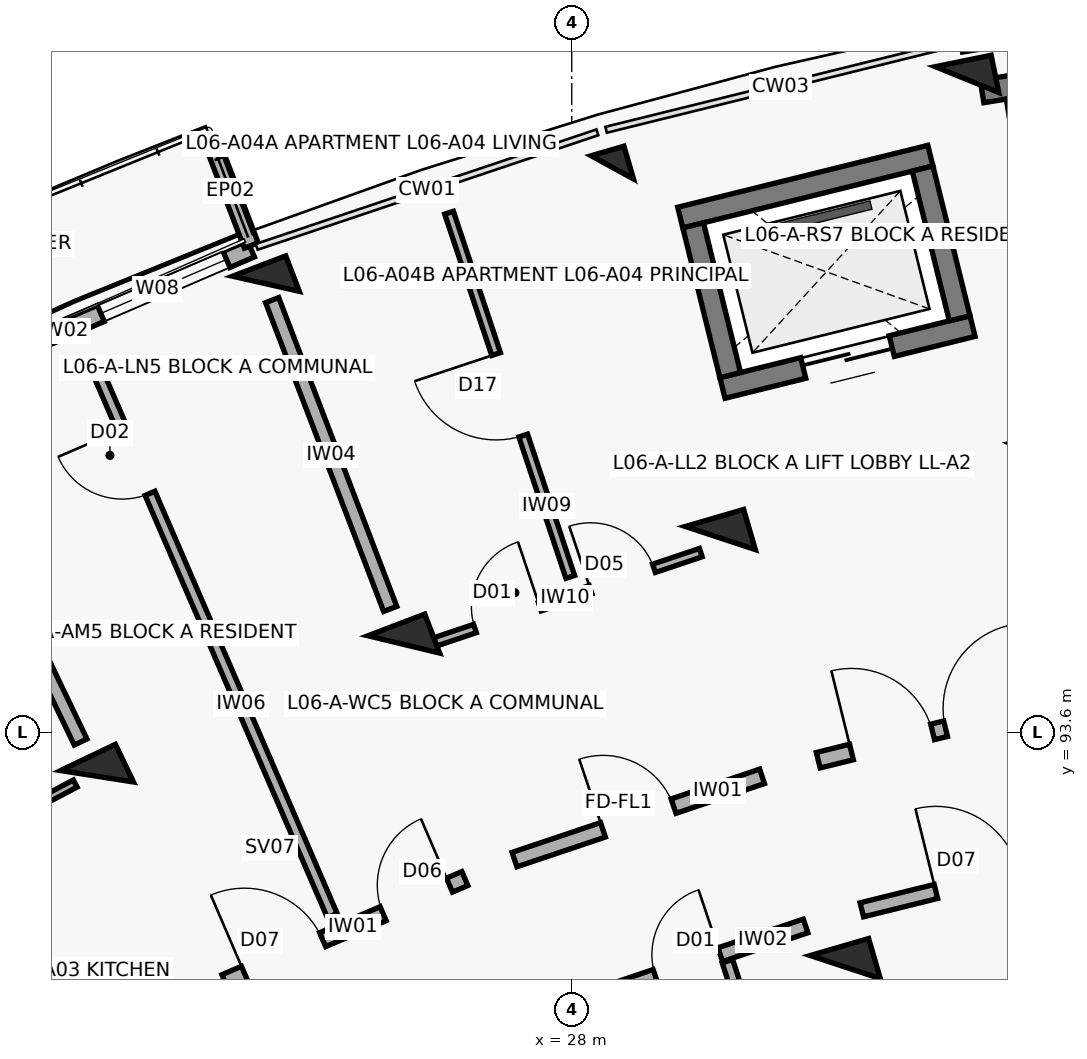
"""IFC4 building model, lengths in metres.
Left out: names, types, materials, properties, quantities, classifications, styles, units other than length and angle.
Written with IfcOpenShell. Run it as: python <this file> out.ifc"""

import sys

from ifc_helpers import new_model, si_unit, direction, frame, frame_2d, origin, origin_2d, place, context, subcontext, project, spatial, rectangle, extrude, element, fill, save


model = new_model("IFC4")
c1 = context("Model", 3, precision=1e-05, world=origin(), true_north=direction((0.0, 1.0)))
c2 = subcontext(c1, "Body", "Model", "MODEL_VIEW")
j1 = project(units=[si_unit("LENGTHUNIT", "METRE"), si_unit("PLANEANGLEUNIT", "RADIAN")], contexts=[c1])
p1 = place(None, origin())
s1 = spatial("IfcSite", under=j1, at=p1, CompositionType="ELEMENT")
p2 = place(p1, origin())
s2 = spatial("IfcBuilding", under=s1, at=p2, CompositionType="ELEMENT")
p3 = place(p2, frame((0.0, 0.0, 20.5)))
s3 = spatial("IfcBuildingStorey", under=s2, at=p3, CompositionType="ELEMENT", Elevation=20.5)
for number, where, z_axis, x_axis in (
    (1, (21.754, 93.019, 0.0), (0.0, 0.0, 1.0), (-0.432, 0.902, 0.0)),
    (2, (25.79, 94.753, 0.0), (0.0, 0.0, 1.0), (-0.357, 0.934, 0.0)),
):
    element("IfcColumn", number, at=place(p3, frame(where, z_axis=z_axis, x_axis=x_axis)), inside=s3, PredefinedType="COLUMN", context=c2, shape_type="SweptSolid", body=[
        extrude(rectangle(XDim=0.55, YDim=0.8, at=origin_2d()), origin(), (0.0, 0.0, 1.0), 3.1),
    ])
p4 = place(p3, frame((23.976, 99.499, 0.0), z_axis=(0.0, 0.0, 1.0), x_axis=(-0.357064076459, 0.934079892355, 0.0)))
e3 = element("IfcColumn", 3, at=p4, inside=s3, PredefinedType="COLUMN", context=c2, shape_type="SweptSolid", body=[
    extrude(rectangle(XDim=0.5, YDim=0.75, at=origin_2d()), origin(), (0.0, 0.0, 1.0), 3.1),
])
for number, where, z_axis, x_axis in (
    (4, (31.599, 90.508, 0.0), (0.0, 0.0, 1.0), (-0.28, 0.96, 0.0)),
    (5, (29.954, 96.153, 0.0), (0.0, 0.0, 1.0), (-0.28, 0.96, 0.0)),
):
    element("IfcColumn", number, at=place(p3, frame(where, z_axis=z_axis, x_axis=x_axis)), inside=s3, PredefinedType="COLUMN", context=c2, shape_type="SweptSolid", body=[
        extrude(rectangle(XDim=0.55, YDim=0.8, at=origin_2d()), origin(), (0.0, 0.0, 1.0), 3.1),
    ])
p5 = place(p3, frame((28.533, 101.031, 0.0), z_axis=(0.0, 0.0, 1.0), x_axis=(-0.27966144946, 0.96009867914, 0.0)))
e6 = element("IfcColumn", 6, at=p5, inside=s3, PredefinedType="COLUMN", context=c2, shape_type="SweptSolid", body=[
    extrude(rectangle(XDim=0.45, YDim=0.45, at=origin_2d()), origin(), (0.0, 0.0, 1.0), 3.1),
])
p6 = place(p3, frame((33.201, 102.186, 0.0), z_axis=(0.0, 0.0, 1.0), x_axis=(-0.200393999665, 0.979715389742, 0.0)))
e7 = element("IfcColumn", 7, at=p6, inside=s3, PredefinedType="COLUMN", context=c2, shape_type="SweptSolid", body=[
    extrude(rectangle(XDim=0.5, YDim=0.75, at=origin_2d()), origin(), (0.0, 0.0, 1.0), 3.1),
])
p7 = place(p3, frame((19.361, 98.059, 0.0), z_axis=(0.0, 0.0, 1.0), x_axis=(0.918711189033, 0.394930058548, 0.0)))
e8 = element("IfcWall", 8, at=p7, inside=s3, PredefinedType="SOLIDWALL", context=c2, shape_type="SweptSolid", body=[
    extrude(rectangle(XDim=4.809, YDim=0.23, at=frame_2d((2.404, 0.0))), origin(), (0.0, 0.0, 1.0), 2.25),
])
p8 = place(p7, frame((0.4, 0.0, 0.0)))
e9 = element("IfcOpeningElement", 9, at=p8, cuts=e8, PredefinedType="OPENING", context=c2, shape_type="SweptSolid", body=[
    extrude(rectangle(XDim=1.1, YDim=2.15, at=frame_2d((0.55, 1.075))), frame((0.0, 0.125, 0.0), z_axis=(0.0, -1.0, 0.0), x_axis=(1.0, 0.0, 0.0)), (0.0, 0.0, 1.0), 0.25),
])
p9 = place(p7, frame((2.659, 0.0, 0.35)))
e10 = element("IfcOpeningElement", 10, at=p9, cuts=e8, PredefinedType="OPENING", context=c2, shape_type="SweptSolid", body=[
    extrude(rectangle(XDim=1.8, YDim=1.65, at=frame_2d((0.9, 0.825))), frame((0.0, 0.125, 0.0), z_axis=(0.0, -1.0, 0.0), x_axis=(1.0, 0.0, 0.0)), (0.0, 0.0, 1.0), 0.25),
])
p10 = place(p3, frame((23.783, 100.003, 0.0), z_axis=(0.0, 0.0, 1.0), x_axis=(-0.356957296461, 0.934120703391, 0.0)))
e11 = element("IfcWall", 11, at=p10, inside=s3, PredefinedType="PARAPET", context=c2, shape_type="SweptSolid", body=[
    extrude(rectangle(XDim=1.53, YDim=0.195, at=frame_2d((0.765, 0.0))), origin(), (0.0, 0.0, 1.0), 2.25),
])
p11 = place(p3, frame((33.12, 102.679, 0.0), z_axis=(0.0, 0.0, 1.0), x_axis=(0.987080750493, 0.160223568819, 0.0)))
e12 = element("IfcWall", 12, at=p11, inside=s3, PredefinedType="SOLIDWALL", context=c2, shape_type="SweptSolid", body=[
    extrude(rectangle(XDim=4.809, YDim=0.265, at=frame_2d((2.404, 0.0))), origin(), (0.0, 0.0, 1.0), 2.25),
])
p12 = place(p3, frame((37.81, 102.745, 0.0), z_axis=(0.0, 0.0, 1.0), x_axis=(-0.987084710126, -0.160199173019, 0.0)))
e13 = element("IfcWall", 13, at=p12, inside=s3, PredefinedType="SHEAR", context=c2, shape_type="SweptSolid", body=[
    extrude(rectangle(XDim=4.47, YDim=0.3, at=frame_2d((2.235, 0.0))), origin(), (0.0, 0.0, 1.0), 3.1),
])
p13 = place(p3, frame((35.098, 94.363, 0.0), z_axis=(0.0, 0.0, 1.0), x_axis=(-0.160227496777, 0.987080112897, 0.0)))
e14 = element("IfcWall", 14, at=p13, inside=s3, PredefinedType="SHEAR", context=c2, shape_type="SweptSolid", body=[
    extrude(rectangle(XDim=7.69, YDim=0.3, at=frame_2d((3.845, 0.0))), origin(), (0.0, 0.0, 1.0), 3.1),
])
p14 = place(p3, frame((33.273, 98.942, 0.0), z_axis=(0.0, 0.0, 1.0), x_axis=(-0.970707542441, -0.240264160972, 0.0)))
e15 = element("IfcWall", 15, at=p14, inside=s3, PredefinedType="SHEAR", context=c2, shape_type="SweptSolid", body=[
    extrude(rectangle(XDim=3.39, YDim=0.28, at=frame_2d((1.695, 0.0))), origin(), (0.0, 0.0, 1.0), 3.1),
])
p15 = place(p14, frame((1.095, 0.0, 0.0)))
e16 = element("IfcOpeningElement", 16, at=p15, cuts=e15, PredefinedType="OPENING", context=c2, shape_type="SweptSolid", body=[
    extrude(rectangle(XDim=1.2, YDim=2.15, at=frame_2d((0.6, 1.075))), frame((0.0, 0.15, 0.0), z_axis=(0.0, -1.0, 0.0), x_axis=(1.0, 0.0, 0.0)), (0.0, 0.0, 1.0), 0.3),
])
p16 = place(p3, frame((32.718, 101.185, 0.0), z_axis=(0.0, 0.0, 1.0), x_axis=(-0.970711699588, -0.240247364777, 0.0)))
e17 = element("IfcWall", 17, at=p16, inside=s3, PredefinedType="SHEAR", context=c2, shape_type="SweptSolid", body=[
    extrude(rectangle(XDim=3.39, YDim=0.28, at=frame_2d((1.695, 0.0))), origin(), (0.0, 0.0, 1.0), 3.1),
])
p17 = place(p3, frame((33.104, 99.044, 0.0), z_axis=(0.0, 0.0, 1.0), x_axis=(-0.240186044774, 0.970726873995, 0.0)))
e18 = element("IfcWall", 18, at=p17, inside=s3, PredefinedType="SHEAR", context=c2, shape_type="SweptSolid", body=[
    extrude(rectangle(XDim=2.03, YDim=0.28, at=frame_2d((1.015, 0.0))), origin(), (0.0, 0.0, 1.0), 3.1),
])
p18 = place(p3, frame((30.085, 98.297, 0.0), z_axis=(0.0, 0.0, 1.0), x_axis=(-0.2402993748, 0.970698825832, 0.0)))
e19 = element("IfcWall", 19, at=p18, inside=s3, PredefinedType="SHEAR", context=c2, shape_type="SweptSolid", body=[
    extrude(rectangle(XDim=2.03, YDim=0.28, at=frame_2d((1.015, 0.0))), origin(), (0.0, 0.0, 1.0), 3.1),
])
p19 = place(p3, frame((18.113, 91.144, 0.0), z_axis=(0.0, 0.0, 1.0), x_axis=(0.88341855112, 0.46858474531, 0.0)))
e20 = element("IfcWall", 20, at=p19, inside=s3, PredefinedType="PARTITIONING", context=c2, shape_type="SweptSolid", body=[
    extrude(rectangle(XDim=3.797, YDim=0.105, at=frame_2d((1.898, 0.0))), origin(), (0.0, 0.0, 1.0), 2.08),
])
p20 = place(p19, frame((0.65, 0.0, 0.0)))
e21 = element("IfcOpeningElement", 21, at=p20, cuts=e20, PredefinedType="OPENING", context=c2, shape_type="SweptSolid", body=[
    extrude(rectangle(XDim=0.9, YDim=2.1, at=frame_2d((0.45, 1.05))), frame((0.0, 0.062, 0.0), z_axis=(0.0, -1.0, 0.0), x_axis=(1.0, 0.0, 0.0)), (0.0, 0.0, 1.0), 0.125),
])
p21 = place(p19, frame((2.267, 0.0, 0.0)))
e22 = element("IfcOpeningElement", 22, at=p21, cuts=e20, PredefinedType="OPENING", context=c2, shape_type="SweptSolid", body=[
    extrude(rectangle(XDim=0.88, YDim=2.1, at=frame_2d((0.44, 1.05))), frame((0.0, 0.062, 0.0), z_axis=(0.0, -1.0, 0.0), x_axis=(1.0, 0.0, 0.0)), (0.0, 0.0, 1.0), 0.125),
])
p22 = place(p3, frame((23.437, 90.316, 0.0), z_axis=(0.0, 0.0, 1.0), x_axis=(0.918718172399, 0.394913813008, 0.0)))
e23 = element("IfcWall", 23, at=p22, inside=s3, PredefinedType="SOLIDWALL", context=c2, shape_type="SweptSolid", body=[
    extrude(rectangle(XDim=3.436, YDim=0.2, at=frame_2d((1.718, 0.0))), origin(), (0.0, 0.0, 1.0), 2.08),
])
p23 = place(p22, frame((0.28, 0.0, 0.0)))
e24 = element("IfcOpeningElement", 24, at=p23, cuts=e23, PredefinedType="OPENING", context=c2, shape_type="SweptSolid", body=[
    extrude(rectangle(XDim=1.12, YDim=2.15, at=frame_2d((0.56, 1.075))), frame((0.0, 0.11, 0.0), z_axis=(0.0, -1.0, 0.0), x_axis=(1.0, 0.0, 0.0)), (0.0, 0.0, 1.0), 0.22),
])
p24 = place(p22, frame((2.266, 0.0, 0.0)))
e25 = element("IfcOpeningElement", 25, at=p24, cuts=e23, PredefinedType="OPENING", context=c2, shape_type="SweptSolid", body=[
    extrude(rectangle(XDim=0.95, YDim=2.1, at=frame_2d((0.475, 1.05))), frame((0.0, 0.11, 0.0), z_axis=(0.0, -1.0, 0.0), x_axis=(1.0, 0.0, 0.0)), (0.0, 0.0, 1.0), 0.22),
])
p25 = place(p3, frame((24.849, 91.187, 0.0), z_axis=(0.0, 0.0, 1.0), x_axis=(-0.396278945437, 0.91813016365, 0.0)))
e26 = element("IfcWall", 26, at=p25, inside=s3, PredefinedType="PARTITIONING", context=c2, shape_type="SweptSolid", body=[
    extrude(rectangle(XDim=7.95, YDim=0.14, at=frame_2d((3.975, 0.0))), origin(), (0.0, 0.0, 1.0), 2.08),
])
p26 = place(p25, frame((6.05, 0.0, 0.0)))
e27 = element("IfcOpeningElement", 27, at=p26, cuts=e26, PredefinedType="OPENING", context=c2, shape_type="SweptSolid", body=[
    extrude(rectangle(XDim=0.92, YDim=2.1, at=frame_2d((0.46, 1.05))), frame((0.0, 0.08, 0.0), z_axis=(0.0, -1.0, 0.0), x_axis=(1.0, 0.0, 0.0)), (0.0, 0.0, 1.0), 0.16),
])
p27 = place(p3, frame((21.538, 93.469, 0.0), z_axis=(0.0, 0.0, 1.0), x_axis=(-0.432086898897, 0.901831975371, 0.0)))
e28 = element("IfcWall", 28, at=p27, inside=s3, PredefinedType="SOLIDWALL", context=c2, shape_type="SweptSolid", body=[
    extrude(rectangle(XDim=4.35, YDim=0.185, at=frame_2d((2.175, 0.0))), origin(), (0.0, 0.0, 1.0), 2.08),
])
p28 = place(p3, frame((27.247, 91.923, 0.0), z_axis=(0.0, 0.0, 1.0), x_axis=(0.947863007629, 0.318678080151, 0.0)))
e29 = element("IfcWall", 29, at=p28, inside=s3, PredefinedType="SOLIDWALL", context=c2, shape_type="SweptSolid", body=[
    extrude(rectangle(XDim=3.436, YDim=0.2, at=frame_2d((1.718, 0.0))), origin(), (0.0, 0.0, 1.0), 2.08),
])
p29 = place(p28, frame((1.228, 0.0, 0.0)))
e30 = element("IfcOpeningElement", 30, at=p29, cuts=e29, PredefinedType="OPENING", context=c2, shape_type="SweptSolid", body=[
    extrude(rectangle(XDim=0.98, YDim=2.15, at=frame_2d((0.49, 1.075))), frame((0.0, 0.11, 0.0), z_axis=(0.0, -1.0, 0.0), x_axis=(1.0, 0.0, 0.0)), (0.0, 0.0, 1.0), 0.22),
])
p30 = place(p3, frame((27.979, 90.008, 0.0), z_axis=(0.0, 0.0, 1.0), x_axis=(0.94787351033, 0.318646839643, 0.0)))
e31 = element("IfcWall", 31, at=p30, inside=s3, PredefinedType="SOLIDWALL", context=c2, shape_type="SweptSolid", body=[
    extrude(rectangle(XDim=3.269, YDim=0.19, at=frame_2d((1.634, 0.0))), origin(), (0.0, 0.0, 1.0), 2.08),
])
p31 = place(p30, frame((1.184, 0.0, 0.0)))
e32 = element("IfcOpeningElement", 32, at=p31, cuts=e31, PredefinedType="OPENING", context=c2, shape_type="SweptSolid", body=[
    extrude(rectangle(XDim=0.9, YDim=2.1, at=frame_2d((0.45, 1.05))), frame((0.0, 0.105, 0.0), z_axis=(0.0, -1.0, 0.0), x_axis=(1.0, 0.0, 0.0)), (0.0, 0.0, 1.0), 0.21),
])
p32 = place(p3, frame((31.066, 87.446, 0.0), z_axis=(0.0, 0.0, 1.0), x_axis=(-0.308582493915, 0.951197584337, 0.0)))
e33 = element("IfcWall", 33, at=p32, inside=s3, PredefinedType="PARTITIONING", context=c2, shape_type="SweptSolid", body=[
    extrude(rectangle(XDim=3.3, YDim=0.145, at=frame_2d((1.65, 0.0))), origin(), (0.0, 0.0, 1.0), 2.08),
])
p33 = place(p32, frame((1.21, 0.0, 0.0)))
e34 = element("IfcOpeningElement", 34, at=p33, cuts=e33, PredefinedType="OPENING", context=c2, shape_type="SweptSolid", body=[
    extrude(rectangle(XDim=0.88, YDim=2.1, at=frame_2d((0.44, 1.05))), frame((0.0, 0.083, 0.0), z_axis=(0.0, -1.0, 0.0), x_axis=(1.0, 0.0, 0.0)), (0.0, 0.0, 1.0), 0.165),
])
p34 = place(p3, frame((26.11, 94.756, 0.0), z_axis=(0.0, 0.0, 1.0), x_axis=(0.947873924847, 0.318645606584, 0.0)))
e35 = element("IfcWall", 35, at=p34, inside=s3, PredefinedType="PARTITIONING", context=c2, shape_type="SweptSolid", body=[
    extrude(rectangle(XDim=3.785, YDim=0.115, at=frame_2d((1.893, 0.0))), origin(), (0.0, 0.0, 1.0), 2.08),
])
p35 = place(p34, frame((0.65, 0.0, 0.0)))
e36 = element("IfcOpeningElement", 36, at=p35, cuts=e35, PredefinedType="OPENING", context=c2, shape_type="SweptSolid", body=[
    extrude(rectangle(XDim=0.9, YDim=2.1, at=frame_2d((0.45, 1.05))), frame((0.0, 0.067, 0.0), z_axis=(0.0, -1.0, 0.0), x_axis=(1.0, 0.0, 0.0)), (0.0, 0.0, 1.0), 0.135),
])
p36 = place(p34, frame((2.255, 0.0, 0.0)))
e37 = element("IfcOpeningElement", 37, at=p36, cuts=e35, PredefinedType="OPENING", context=c2, shape_type="SweptSolid", body=[
    extrude(rectangle(XDim=0.88, YDim=2.1, at=frame_2d((0.44, 1.05))), frame((0.0, 0.067, 0.0), z_axis=(0.0, -1.0, 0.0), x_axis=(1.0, 0.0, 0.0)), (0.0, 0.0, 1.0), 0.135),
])
p37 = place(p3, frame((27.98, 95.642, 0.0), z_axis=(0.0, 0.0, 1.0), x_axis=(-0.315749098291, 0.948842719806, 0.0)))
e38 = element("IfcWall", 38, at=p37, inside=s3, PredefinedType="PARTITIONING", context=c2, shape_type="SweptSolid", body=[
    extrude(rectangle(XDim=5.05, YDim=0.12, at=frame_2d((2.525, 0.0))), origin(), (0.0, 0.0, 1.0), 2.08),
])
p38 = place(p37, frame((1.96, 0.0, 0.0)))
e39 = element("IfcOpeningElement", 39, at=p38, cuts=e38, PredefinedType="OPENING", context=c2, shape_type="SweptSolid", body=[
    extrude(rectangle(XDim=1.13, YDim=2.1, at=frame_2d((0.565, 1.05))), frame((0.0, 0.07, 0.0), z_axis=(0.0, -1.0, 0.0), x_axis=(1.0, 0.0, 0.0)), (0.0, 0.0, 1.0), 0.14),
])
p39 = place(p3, frame((25.611, 95.22, 0.0), z_axis=(0.0, 0.0, 1.0), x_axis=(-0.357064016205, 0.934079915388, 0.0)))
e40 = element("IfcWall", 40, at=p39, inside=s3, PredefinedType="SOLIDWALL", context=c2, shape_type="SweptSolid", body=[
    extrude(rectangle(XDim=4.35, YDim=0.185, at=frame_2d((2.175, 0.0))), origin(), (0.0, 0.0, 1.0), 2.08),
])
p40 = place(p3, frame((31.243, 93.23, 0.0), z_axis=(0.0, 0.0, 1.0), x_axis=(0.970719238682, 0.240216901263, 0.0)))
e41 = element("IfcWall", 41, at=p40, inside=s3, PredefinedType="SOLIDWALL", context=c2, shape_type="SweptSolid", body=[
    extrude(rectangle(XDim=3.296, YDim=0.21, at=frame_2d((1.648, 0.0))), origin(), (0.0, 0.0, 1.0), 2.08),
])
p41 = place(p40, frame((0.45, 0.0, 0.0)))
e42 = element("IfcOpeningElement", 42, at=p41, cuts=e41, PredefinedType="OPENING", context=c2, shape_type="SweptSolid", body=[
    extrude(rectangle(XDim=1.1, YDim=2.15, at=frame_2d((0.55, 1.075))), frame((0.0, 0.115, 0.0), z_axis=(0.0, -1.0, 0.0), x_axis=(1.0, 0.0, 0.0)), (0.0, 0.0, 1.0), 0.23),
])
p42 = place(p40, frame((1.726, 0.0, 0.0)))
e43 = element("IfcOpeningElement", 43, at=p42, cuts=e41, PredefinedType="OPENING", context=c2, shape_type="SweptSolid", body=[
    extrude(rectangle(XDim=1.12, YDim=2.15, at=frame_2d((0.56, 1.075))), frame((0.0, 0.115, 0.0), z_axis=(0.0, -1.0, 0.0), x_axis=(1.0, 0.0, 0.0)), (0.0, 0.0, 1.0), 0.23),
])
p43 = place(p3, frame((31.816, 91.262, 0.0), z_axis=(0.0, 0.0, 1.0), x_axis=(0.970727194092, 0.240184751078, 0.0)))
e44 = element("IfcWall", 44, at=p43, inside=s3, PredefinedType="SOLIDWALL", context=c2, shape_type="SweptSolid", body=[
    extrude(rectangle(XDim=3.129, YDim=0.19, at=frame_2d((1.564, 0.0))), origin(), (0.0, 0.0, 1.0), 2.08),
])
p44 = place(p43, frame((1.004, 0.0, 0.0)))
e45 = element("IfcOpeningElement", 45, at=p44, cuts=e44, PredefinedType="OPENING", context=c2, shape_type="SweptSolid", body=[
    extrude(rectangle(XDim=1.12, YDim=2.15, at=frame_2d((0.56, 1.075))), frame((0.0, 0.105, 0.0), z_axis=(0.0, -1.0, 0.0), x_axis=(1.0, 0.0, 0.0)), (0.0, 0.0, 1.0), 0.21),
])
p45 = place(p9, origin())
e46 = element("IfcWindow", 46, at=p45, inside=s3, PartitioningType="TRIPLE_PANEL_VERTICAL", PredefinedType="WINDOW", context=c2, shape_type="SweptSolid", body=[
    extrude(rectangle(XDim=1.8, YDim=1.65, at=frame_2d((0.9, 0.825))), frame((0.0, 0.03, 0.0), z_axis=(0.0, -1.0, 0.0), x_axis=(1.0, 0.0, 0.0)), (0.0, 0.0, 1.0), 0.06),
])
fill(e10, e46)
p46 = place(p15, origin())
e47 = element("IfcDoor", 47, at=p46, inside=s3, OperationType="DOUBLE_DOOR_SLIDING", PredefinedType="DOOR", context=c2, shape_type="SweptSolid", body=[
    extrude(rectangle(XDim=1.2, YDim=2.15, at=frame_2d((0.6, 1.075))), frame((0.0, 0.025, 0.0), z_axis=(0.0, -1.0, 0.0), x_axis=(1.0, 0.0, 0.0)), (0.0, 0.0, 1.0), 0.05),
])
fill(e16, e47)
p47 = place(p23, origin())
e48 = element("IfcDoor", 48, at=p47, inside=s3, OperationType="SINGLE_SWING_LEFT", PredefinedType="DOOR", context=c2, shape_type="SweptSolid", body=[
    extrude(rectangle(XDim=1.12, YDim=2.15, at=frame_2d((0.56, 1.075))), frame((0.0, 0.025, 0.0), z_axis=(0.0, -1.0, 0.0), x_axis=(1.0, 0.0, 0.0)), (0.0, 0.0, 1.0), 0.05),
])
fill(e24, e48)
p48 = place(p24, origin())
e49 = element("IfcDoor", 49, at=p48, inside=s3, OperationType="SINGLE_SWING_RIGHT", PredefinedType="DOOR", context=c2, shape_type="SweptSolid", body=[
    extrude(rectangle(XDim=0.95, YDim=2.1, at=frame_2d((0.475, 1.05))), frame((0.0, 0.025, 0.0), z_axis=(0.0, -1.0, 0.0), x_axis=(1.0, 0.0, 0.0)), (0.0, 0.0, 1.0), 0.05),
])
fill(e25, e49)
p49 = place(p26, origin())
e50 = element("IfcDoor", 50, at=p49, inside=s3, OperationType="SINGLE_SWING_RIGHT", PredefinedType="DOOR", context=c2, shape_type="SweptSolid", body=[
    extrude(rectangle(XDim=0.92, YDim=2.1, at=frame_2d((0.46, 1.05))), frame((0.0, 0.025, 0.0), z_axis=(0.0, -1.0, 0.0), x_axis=(1.0, 0.0, 0.0)), (0.0, 0.0, 1.0), 0.05),
])
fill(e27, e50)
p50 = place(p29, origin())
e51 = element("IfcDoor", 51, at=p50, inside=s3, OperationType="SINGLE_SWING_LEFT", PredefinedType="DOOR", context=c2, shape_type="SweptSolid", body=[
    extrude(rectangle(XDim=0.98, YDim=2.15, at=frame_2d((0.49, 1.075))), frame((0.0, 0.025, 0.0), z_axis=(0.0, -1.0, 0.0), x_axis=(1.0, 0.0, 0.0)), (0.0, 0.0, 1.0), 0.05),
])
fill(e30, e51)
p51 = place(p31, origin())
e52 = element("IfcDoor", 52, at=p51, inside=s3, OperationType="SINGLE_SWING_RIGHT", PredefinedType="DOOR", context=c2, shape_type="SweptSolid", body=[
    extrude(rectangle(XDim=0.9, YDim=2.1, at=frame_2d((0.45, 1.05))), frame((0.0, 0.025, 0.0), z_axis=(0.0, -1.0, 0.0), x_axis=(1.0, 0.0, 0.0)), (0.0, 0.0, 1.0), 0.05),
])
fill(e32, e52)
p52 = place(p35, origin())
e53 = element("IfcDoor", 53, at=p52, inside=s3, OperationType="SINGLE_SWING_RIGHT", PredefinedType="DOOR", context=c2, shape_type="SweptSolid", body=[
    extrude(rectangle(XDim=0.9, YDim=2.1, at=frame_2d((0.45, 1.05))), frame((0.0, 0.025, 0.0), z_axis=(0.0, -1.0, 0.0), x_axis=(1.0, 0.0, 0.0)), (0.0, 0.0, 1.0), 0.05),
])
fill(e36, e53)
p53 = place(p36, origin())
e54 = element("IfcDoor", 54, at=p53, inside=s3, OperationType="SINGLE_SWING_LEFT", PredefinedType="DOOR", context=c2, shape_type="SweptSolid", body=[
    extrude(rectangle(XDim=0.88, YDim=2.1, at=frame_2d((0.44, 1.05))), frame((0.0, 0.025, 0.0), z_axis=(0.0, -1.0, 0.0), x_axis=(1.0, 0.0, 0.0)), (0.0, 0.0, 1.0), 0.05),
])
fill(e37, e54)
p54 = place(p38, origin())
e55 = element("IfcDoor", 55, at=p54, inside=s3, OperationType="SINGLE_SWING_RIGHT", PredefinedType="DOOR", context=c2, shape_type="SweptSolid", body=[
    extrude(rectangle(XDim=1.13, YDim=2.1, at=frame_2d((0.565, 1.05))), frame((0.0, 0.025, 0.0), z_axis=(0.0, -1.0, 0.0), x_axis=(1.0, 0.0, 0.0)), (0.0, 0.0, 1.0), 0.05),
])
fill(e39, e55)
p55 = place(p41, origin())
e56 = element("IfcDoor", 56, at=p55, inside=s3, OperationType="SINGLE_SWING_LEFT", PredefinedType="DOOR", context=c2, shape_type="SweptSolid", body=[
    extrude(rectangle(XDim=1.1, YDim=2.15, at=frame_2d((0.55, 1.075))), frame((0.0, 0.025, 0.0), z_axis=(0.0, -1.0, 0.0), x_axis=(1.0, 0.0, 0.0)), (0.0, 0.0, 1.0), 0.05),
])
fill(e42, e56)
p56 = place(p42, origin())
e57 = element("IfcDoor", 57, at=p56, inside=s3, OperationType="SINGLE_SWING_RIGHT", PredefinedType="DOOR", context=c2, shape_type="SweptSolid", body=[
    extrude(rectangle(XDim=1.12, YDim=2.15, at=frame_2d((0.56, 1.075))), frame((0.0, 0.025, 0.0), z_axis=(0.0, -1.0, 0.0), x_axis=(1.0, 0.0, 0.0)), (0.0, 0.0, 1.0), 0.05),
])
fill(e43, e57)
p57 = place(p44, origin())
e58 = element("IfcDoor", 58, at=p57, inside=s3, OperationType="SINGLE_SWING_LEFT", PredefinedType="DOOR", context=c2, shape_type="SweptSolid", body=[
    extrude(rectangle(XDim=1.12, YDim=2.15, at=frame_2d((0.56, 1.075))), frame((0.0, 0.025, 0.0), z_axis=(0.0, -1.0, 0.0), x_axis=(1.0, 0.0, 0.0)), (0.0, 0.0, 1.0), 0.05),
])
fill(e45, e58)
save(model, sys.argv[1])
